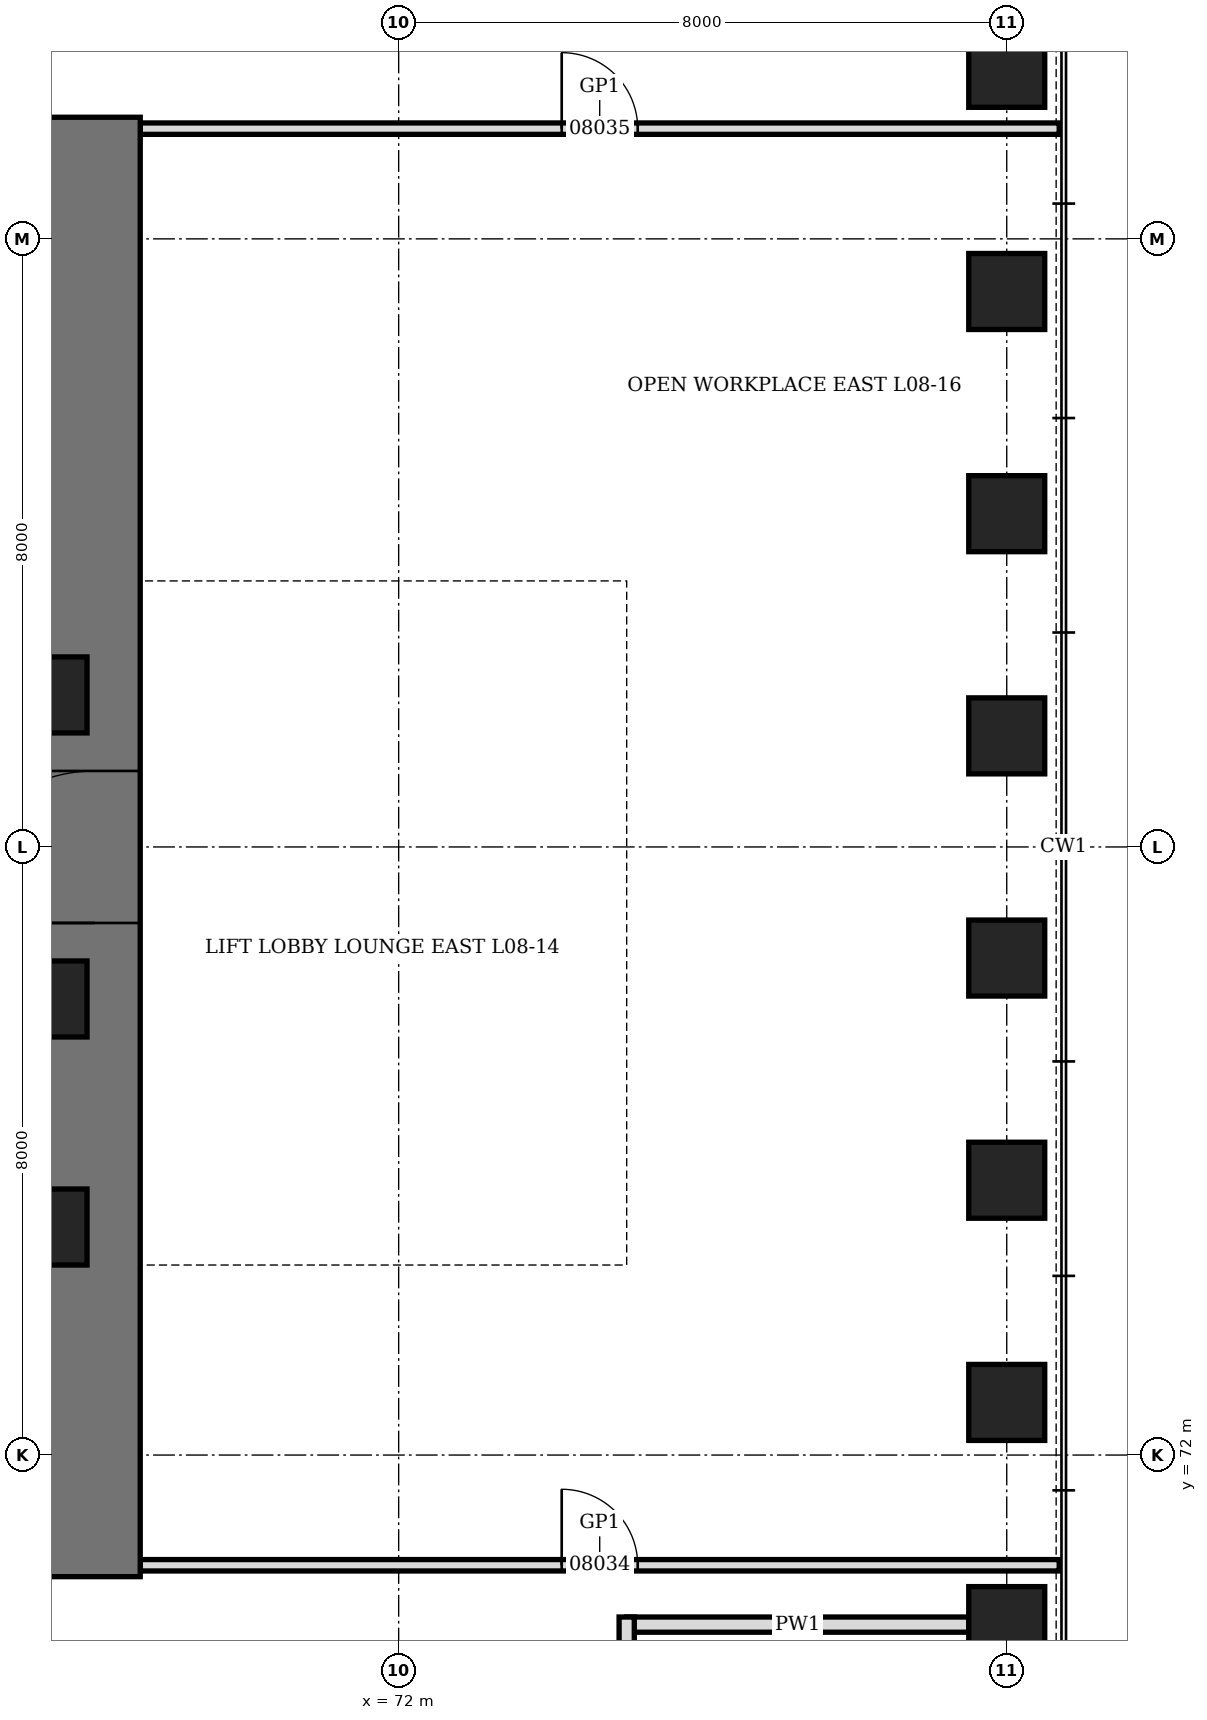
"""IFC4 building model, lengths in metres.
Left out: names, types, materials, properties, quantities, classifications, styles, units other than length and angle.
Written with IfcOpenShell. Run it as: python <this file> out.ifc"""

import sys

from ifc_helpers import new_model, si_unit, direction, frame, frame_2d, origin, origin_2d, place, context, subcontext, project, spatial, rectangle, hollow_rectangle, extrude, element, fill, save


model = new_model("IFC4")
c1 = context("Model", 3, precision=1e-05, world=origin(), true_north=direction((0.0, 1.0)))
c2 = subcontext(c1, "Body", "Model", "MODEL_VIEW")
j1 = project(units=[si_unit("LENGTHUNIT", "METRE"), si_unit("PLANEANGLEUNIT", "RADIAN")], contexts=[c1])
p1 = place(None, origin())
s1 = spatial("IfcSite", under=j1, at=p1, CompositionType="ELEMENT")
p2 = place(p1, origin())
s2 = spatial("IfcBuilding", under=s1, at=p2, CompositionType="ELEMENT")
p3 = place(p2, frame((0.0, 0.0, 43.3)))
s3 = spatial("IfcBuildingStorey", under=s2, at=p3, CompositionType="ELEMENT", Elevation=43.3)
for number, where, z_axis, x_axis in (
    (1, (80.0, 69.769, 0.0), (0.0, 0.0, 1.0), (0.0, 1.0, 0.0)),
    (2, (80.0, 72.692, 0.0), (0.0, 0.0, 1.0), (0.0, 1.0, 0.0)),
    (3, (80.0, 75.615, 0.0), (0.0, 0.0, 1.0), (0.0, 1.0, 0.0)),
    (4, (80.0, 78.539, 0.0), (0.0, 0.0, 1.0), (0.0, 1.0, 0.0)),
    (5, (80.0, 81.461, 0.0), (0.0, 0.0, 1.0), (0.0, 1.0, 0.0)),
    (6, (80.0, 84.385, 0.0), (0.0, 0.0, 1.0), (0.0, 1.0, 0.0)),
    (7, (80.0, 87.308, 0.0), (0.0, 0.0, 1.0), (0.0, 1.0, 0.0)),
    (8, (80.0, 90.231, 0.0), (0.0, 0.0, 1.0), (0.0, 1.0, 0.0)),
):
    element("IfcColumn", number, at=place(p3, frame(where, z_axis=z_axis, x_axis=x_axis)), inside=s3, PredefinedType="COLUMN", context=c2, shape_type="SweptSolid", body=[
        extrude(hollow_rectangle(XDim=1.0, YDim=1.0, WallThickness=0.25, at=origin_2d()), origin(), (0.0, 0.0, 1.0), 4.2),
    ])
p4 = place(p3, frame((68.0, 70.4, 0.0), z_axis=(0.0, 0.0, 1.0), x_axis=(0.0, 1.0, 0.0)))
e9 = element("IfcWall", 9, at=p4, inside=s3, PredefinedType="SHEAR", context=c2, shape_type="SweptSolid", body=[
    extrude(rectangle(XDim=19.2, YDim=1.2, at=frame_2d((9.6, 0.0))), origin(), (0.0, 0.0, 1.0), 4.2),
])
p5 = place(p4, frame((8.6, 0.0, 0.0)))
e10 = element("IfcOpeningElement", 10, at=p5, cuts=e9, PredefinedType="OPENING", context=c2, shape_type="SweptSolid", body=[
    extrude(rectangle(XDim=2.0, YDim=2.4, at=frame_2d((1.0, 1.2))), frame((0.0, 0.61, 0.0), z_axis=(0.0, -1.0, 0.0), x_axis=(1.0, 0.0, 0.0)), (0.0, 0.0, 1.0), 1.22),
])
for number, where, z_axis, x_axis in (
    (11, (67.4, 75.0, 0.0), (0.0, 0.0, 1.0), (1.0, 0.0, 0.0)),
    (12, (67.4, 78.0, 0.0), (0.0, 0.0, 1.0), (1.0, 0.0, 0.0)),
    (13, (67.4, 82.0, 0.0), (0.0, 0.0, 1.0), (1.0, 0.0, 0.0)),
):
    element("IfcColumn", number, at=place(p3, frame(where, z_axis=z_axis, x_axis=x_axis)), inside=s3, PredefinedType="COLUMN", context=c2, shape_type="SweptSolid", body=[
        extrude(hollow_rectangle(XDim=1.0, YDim=1.0, WallThickness=0.15, at=origin_2d()), origin(), (0.0, 0.0, 1.0), 4.2),
    ])
p6 = place(p3, frame((75.0, 69.769, 0.0), z_axis=(0.0, 0.0, 1.0), x_axis=(1.0, 0.0, 0.0)))
e14 = element("IfcWall", 14, at=p6, inside=s3, PredefinedType="PARTITIONING", context=c2, shape_type="SweptSolid", body=[
    extrude(rectangle(XDim=4.5, YDim=0.2, at=frame_2d((2.25, 0.0))), origin(), (0.0, 0.0, 1.0), 3.428),
])
p7 = place(p3, frame((68.6, 70.55, 0.0), z_axis=(0.0, 0.0, 1.0), x_axis=(1.0, 0.0, 0.0)))
e15 = element("IfcWall", 15, at=p7, inside=s3, PredefinedType="PARTITIONING", context=c2, shape_type="SweptSolid", body=[
    extrude(rectangle(XDim=12.09, YDim=0.15, at=frame_2d((6.045, 0.0))), origin(), (0.0, 0.0, 1.0), 4.04),
])
p8 = place(p7, frame((5.545, 0.0, 0.0)))
e16 = element("IfcOpeningElement", 16, at=p8, cuts=e15, PredefinedType="OPENING", context=c2, shape_type="SweptSolid", body=[
    extrude(rectangle(XDim=1.0, YDim=2.4, at=frame_2d((0.5, 1.2))), frame((0.0, 0.085, 0.0), z_axis=(0.0, -1.0, 0.0), x_axis=(1.0, 0.0, 0.0)), (0.0, 0.0, 1.0), 0.17),
])
p9 = place(p3, frame((68.6, 89.45, 0.0), z_axis=(0.0, 0.0, 1.0), x_axis=(1.0, 0.0, 0.0)))
e17 = element("IfcWall", 17, at=p9, inside=s3, PredefinedType="PARTITIONING", context=c2, shape_type="SweptSolid", body=[
    extrude(rectangle(XDim=12.09, YDim=0.15, at=frame_2d((6.045, 0.0))), origin(), (0.0, 0.0, 1.0), 4.04),
])
p10 = place(p9, frame((5.545, 0.0, 0.0)))
e18 = element("IfcOpeningElement", 18, at=p10, cuts=e17, PredefinedType="OPENING", context=c2, shape_type="SweptSolid", body=[
    extrude(rectangle(XDim=1.0, YDim=2.4, at=frame_2d((0.5, 1.2))), frame((0.0, 0.085, 0.0), z_axis=(0.0, -1.0, 0.0), x_axis=(1.0, 0.0, 0.0)), (0.0, 0.0, 1.0), 0.17),
])
p11 = place(p3, frame((75.0, 61.5, 0.0), z_axis=(0.0, 0.0, 1.0), x_axis=(0.0, 1.0, 0.0)))
e19 = element("IfcWall", 19, at=p11, inside=s3, PredefinedType="PARTITIONING", context=c2, shape_type="SweptSolid", body=[
    extrude(rectangle(XDim=8.369, YDim=0.2, at=frame_2d((4.185, 0.0))), origin(), (0.0, 0.0, 1.0), 4.04),
])
p12 = place(p11, frame((3.385, 0.0, 0.0)))
e20 = element("IfcOpeningElement", 20, at=p12, cuts=e19, PredefinedType="OPENING", context=c2, shape_type="SweptSolid", body=[
    extrude(rectangle(XDim=1.0, YDim=2.1, at=frame_2d((0.5, 1.05))), frame((0.0, 0.11, 0.0), z_axis=(0.0, -1.0, 0.0), x_axis=(1.0, 0.0, 0.0)), (0.0, 0.0, 1.0), 0.22),
])
p13 = place(p5, origin())
e21 = element("IfcDoor", 21, at=p13, inside=s3, OperationType="DOUBLE_DOOR_SINGLE_SWING", PredefinedType="DOOR", context=c2, shape_type="SweptSolid", body=[
    extrude(rectangle(XDim=2.0, YDim=2.4, at=frame_2d((1.0, 1.2))), frame((0.0, 0.35, 0.0), z_axis=(0.0, -1.0, 0.0), x_axis=(1.0, 0.0, 0.0)), (0.0, 0.0, 1.0), 0.7),
])
fill(e10, e21)
p14 = place(p8, origin())
e22 = element("IfcDoor", 22, at=p14, inside=s3, OperationType="SINGLE_SWING_RIGHT", PredefinedType="DOOR", context=c2, shape_type="SweptSolid", body=[
    extrude(rectangle(XDim=1.0, YDim=2.4, at=frame_2d((0.5, 1.2))), frame((0.0, 0.075, 0.0), z_axis=(0.0, -1.0, 0.0), x_axis=(1.0, 0.0, 0.0)), (0.0, 0.0, 1.0), 0.149),
])
fill(e16, e22)
p15 = place(p10, origin())
e23 = element("IfcDoor", 23, at=p15, inside=s3, OperationType="SINGLE_SWING_RIGHT", PredefinedType="DOOR", context=c2, shape_type="SweptSolid", body=[
    extrude(rectangle(XDim=1.0, YDim=2.4, at=frame_2d((0.5, 1.2))), frame((0.0, 0.075, 0.0), z_axis=(0.0, -1.0, 0.0), x_axis=(1.0, 0.0, 0.0)), (0.0, 0.0, 1.0), 0.149),
])
fill(e18, e23)
save(model, sys.argv[1])
